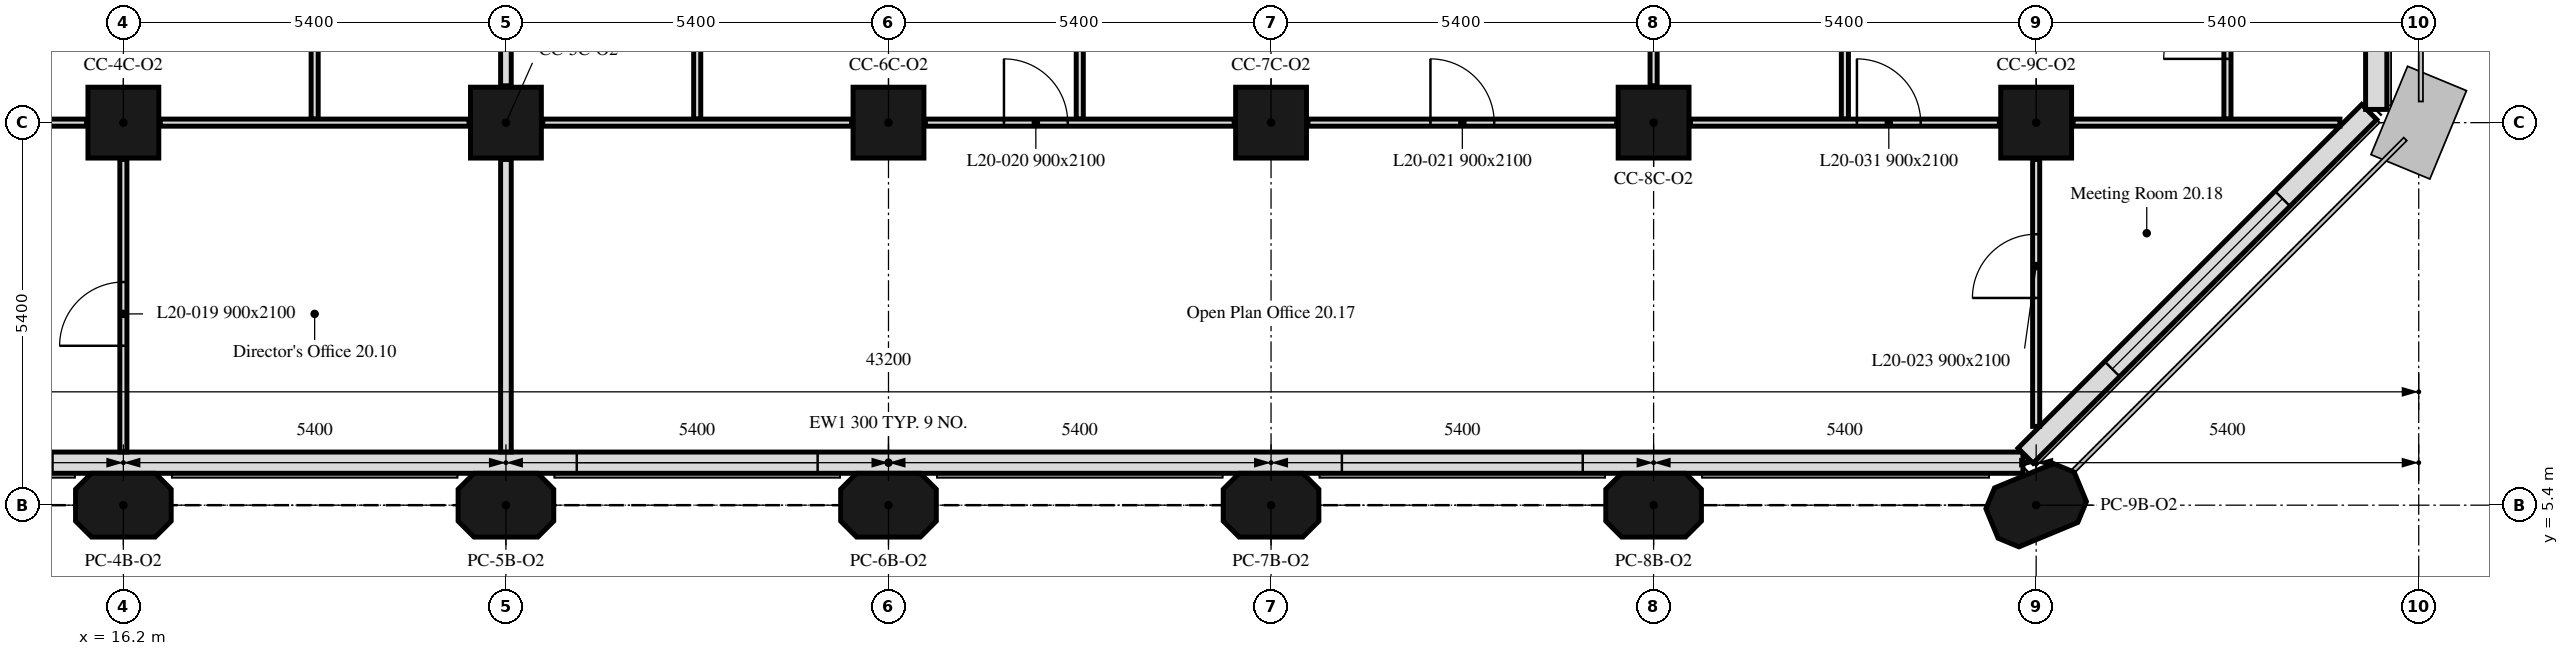
"""IFC4 building model, lengths in metres.
Left out: names, types, materials, properties, quantities, classifications, styles, units other than length and angle.
Written with IfcOpenShell. Run it as: python <this file> out.ifc"""

import sys

from ifc_helpers import new_model, si_unit, direction, frame, frame_2d, origin, origin_2d, place, context, subcontext, project, spatial, polyline, rectangle, outline, extrude, element, fill, save


model = new_model("IFC4")
c1 = context("Model", 3, precision=1e-05, world=origin(), true_north=direction((0.0, 1.0)))
c2 = subcontext(c1, "Body", "Model", "MODEL_VIEW")
j1 = project(units=[si_unit("LENGTHUNIT", "METRE"), si_unit("PLANEANGLEUNIT", "RADIAN")], contexts=[c1])
p1 = place(None, origin())
s1 = spatial("IfcSite", under=j1, at=p1, CompositionType="ELEMENT")
p2 = place(p1, origin())
s2 = spatial("IfcBuilding", under=s1, at=p2, CompositionType="ELEMENT")
p3 = place(p2, frame((0.0, 0.0, 87.8)))
s3 = spatial("IfcBuildingStorey", under=s2, at=p3, CompositionType="ELEMENT", Elevation=87.8)
for number, where, z_axis, x_axis in (
    (1, (16.2, 5.4, 0.0), (0.0, 0.0, 1.0), (1.0, 0.0, 0.0)),
    (2, (21.6, 5.4, 0.0), (0.0, 0.0, 1.0), (1.0, 0.0, 0.0)),
    (3, (27.0, 5.4, 0.0), (0.0, 0.0, 1.0), (1.0, 0.0, 0.0)),
    (4, (32.4, 5.4, 0.0), (0.0, 0.0, 1.0), (1.0, 0.0, 0.0)),
    (5, (37.8, 5.4, 0.0), (0.0, 0.0, 1.0), (1.0, 0.0, 0.0)),
    (6, (43.2, 5.4, 0.0), (0.0, 0.0, 1.0), (0.924, 0.383, 0.0)),
):
    element("IfcColumn", number, at=place(p3, frame(where, z_axis=z_axis, x_axis=x_axis)), inside=s3, PredefinedType="COLUMN", context=c2, shape_type="SweptSolid", body=[
        extrude(outline(polyline([(-0.45, -0.45), (0.45, -0.45), (0.675, -0.225), (0.675, 0.225), (0.45, 0.45), (-0.45, 0.45), (-0.675, 0.225), (-0.675, -0.225), (-0.45, -0.45)])), origin(), (0.0, 0.0, 1.0), 3.5),
    ])
for number, where, z_axis, x_axis in (
    (7, (16.2, 10.8, 0.0), (0.0, 0.0, 1.0), (1.0, 0.0, 0.0)),
    (8, (21.6, 10.8, 0.0), (0.0, 0.0, 1.0), (1.0, 0.0, 0.0)),
    (9, (27.0, 10.8, 0.0), (0.0, 0.0, 1.0), (1.0, 0.0, 0.0)),
    (10, (32.4, 10.8, 0.0), (0.0, 0.0, 1.0), (1.0, 0.0, 0.0)),
    (11, (37.8, 10.8, 0.0), (0.0, 0.0, 1.0), (1.0, 0.0, 0.0)),
    (12, (43.2, 10.8, 0.0), (0.0, 0.0, 1.0), (1.0, 0.0, 0.0)),
):
    element("IfcColumn", number, at=place(p3, frame(where, z_axis=z_axis, x_axis=x_axis)), inside=s3, PredefinedType="COLUMN", context=c2, shape_type="SweptSolid", body=[
        extrude(rectangle(XDim=1.0, YDim=1.0, at=origin_2d()), origin(), (0.0, 0.0, 1.0), 3.5),
    ])
p4 = place(p3, frame((10.986, 6.0, 0.0), z_axis=(0.0, 0.0, 1.0), x_axis=(1.0, 0.0, 0.0)))
e13 = element("IfcWall", 13, at=p4, inside=s3, PredefinedType="SOLIDWALL", context=c2, shape_type="SweptSolid", body=[
    extrude(rectangle(XDim=32.027, YDim=0.3, at=frame_2d((16.014, 0.0))), origin(), (0.0, 0.0, 1.0), 3.5),
])
p5 = place(p4, frame((0.814, 0.0, 0.9)))
e14 = element("IfcOpeningElement", 14, at=p5, cuts=e13, PredefinedType="OPENING", context=c2, shape_type="SweptSolid", body=[
    extrude(rectangle(XDim=3.4, YDim=1.7, at=frame_2d((1.7, 0.85))), frame((0.0, 0.16, 0.0), z_axis=(0.0, -1.0, 0.0), x_axis=(1.0, 0.0, 0.0)), (0.0, 0.0, 1.0), 0.32),
])
p6 = place(p4, frame((11.614, 0.0, 0.9)))
e15 = element("IfcOpeningElement", 15, at=p6, cuts=e13, PredefinedType="OPENING", context=c2, shape_type="SweptSolid", body=[
    extrude(rectangle(XDim=3.4, YDim=1.7, at=frame_2d((1.7, 0.85))), frame((0.0, 0.16, 0.0), z_axis=(0.0, -1.0, 0.0), x_axis=(1.0, 0.0, 0.0)), (0.0, 0.0, 1.0), 0.32),
])
p7 = place(p4, frame((22.414, 0.0, 0.9)))
e16 = element("IfcOpeningElement", 16, at=p7, cuts=e13, PredefinedType="OPENING", context=c2, shape_type="SweptSolid", body=[
    extrude(rectangle(XDim=3.4, YDim=1.7, at=frame_2d((1.7, 0.85))), frame((0.0, 0.16, 0.0), z_axis=(0.0, -1.0, 0.0), x_axis=(1.0, 0.0, 0.0)), (0.0, 0.0, 1.0), 0.32),
])
p8 = place(p3, frame((43.051, 6.099, 0.0), z_axis=(0.0, 0.0, 1.0), x_axis=(0.707106781187, 0.707106781187, 0.0)))
e17 = element("IfcWall", 17, at=p8, inside=s3, PredefinedType="SOLIDWALL", context=c2, shape_type="SweptSolid", body=[
    extrude(rectangle(XDim=6.86, YDim=0.3, at=frame_2d((3.43, 0.0))), origin(), (0.0, 0.0, 1.0), 3.5),
])
p9 = place(p8, frame((1.73, 0.0, 0.9)))
e18 = element("IfcOpeningElement", 18, at=p9, cuts=e17, PredefinedType="OPENING", context=c2, shape_type="SweptSolid", body=[
    extrude(rectangle(XDim=3.4, YDim=1.7, at=frame_2d((1.7, 0.85))), frame((0.0, 0.16, 0.0), z_axis=(0.0, -1.0, 0.0), x_axis=(1.0, 0.0, 0.0)), (0.0, 0.0, 1.0), 0.32),
])
p10 = place(p3, frame((48.0, 10.986, 0.0), z_axis=(0.0, 0.0, 1.0), x_axis=(0.0, 1.0, 0.0)))
e19 = element("IfcWall", 19, at=p10, inside=s3, PredefinedType="SOLIDWALL", context=c2, shape_type="SweptSolid", body=[
    extrude(rectangle(XDim=32.027, YDim=0.3, at=frame_2d((16.014, 0.0))), origin(), (0.0, 0.0, 1.0), 3.5),
])
p11 = place(p10, frame((1.164, 0.0, 0.9)))
e20 = element("IfcOpeningElement", 20, at=p11, cuts=e19, PredefinedType="OPENING", context=c2, shape_type="SweptSolid", body=[
    extrude(rectangle(XDim=1.1, YDim=1.7, at=frame_2d((0.55, 0.85))), frame((0.0, 0.16, 0.0), z_axis=(0.0, -1.0, 0.0), x_axis=(1.0, 0.0, 0.0)), (0.0, 0.0, 1.0), 0.32),
])
p12 = place(p10, frame((2.764, 0.0, 0.9)))
e21 = element("IfcOpeningElement", 21, at=p12, cuts=e19, PredefinedType="OPENING", context=c2, shape_type="SweptSolid", body=[
    extrude(rectangle(XDim=1.1, YDim=1.7, at=frame_2d((0.55, 0.85))), frame((0.0, 0.16, 0.0), z_axis=(0.0, -1.0, 0.0), x_axis=(1.0, 0.0, 0.0)), (0.0, 0.0, 1.0), 0.32),
])
p13 = place(p10, frame((11.614, 0.0, 0.9)))
e22 = element("IfcOpeningElement", 22, at=p13, cuts=e19, PredefinedType="OPENING", context=c2, shape_type="SweptSolid", body=[
    extrude(rectangle(XDim=3.4, YDim=1.7, at=frame_2d((1.7, 0.85))), frame((0.0, 0.16, 0.0), z_axis=(0.0, -1.0, 0.0), x_axis=(1.0, 0.0, 0.0)), (0.0, 0.0, 1.0), 0.32),
])
p14 = place(p10, frame((22.764, 0.0, 0.9)))
e23 = element("IfcOpeningElement", 23, at=p14, cuts=e19, PredefinedType="OPENING", context=c2, shape_type="SweptSolid", body=[
    extrude(rectangle(XDim=1.1, YDim=1.7, at=frame_2d((0.55, 0.85))), frame((0.0, 0.16, 0.0), z_axis=(0.0, -1.0, 0.0), x_axis=(1.0, 0.0, 0.0)), (0.0, 0.0, 1.0), 0.32),
])
p15 = place(p10, frame((24.364, 0.0, 0.9)))
e24 = element("IfcOpeningElement", 24, at=p15, cuts=e19, PredefinedType="OPENING", context=c2, shape_type="SweptSolid", body=[
    extrude(rectangle(XDim=1.1, YDim=1.7, at=frame_2d((0.55, 0.85))), frame((0.0, 0.16, 0.0), z_axis=(0.0, -1.0, 0.0), x_axis=(1.0, 0.0, 0.0)), (0.0, 0.0, 1.0), 0.32),
])
p16 = place(p3, frame((11.32, 10.8, 0.0), z_axis=(0.0, 0.0, 1.0), x_axis=(1.0, 0.0, 0.0)))
e25 = element("IfcWall", 25, at=p16, inside=s3, PredefinedType="PARTITIONING", context=c2, shape_type="SweptSolid", body=[
    extrude(rectangle(XDim=4.36, YDim=0.1, at=frame_2d((2.18, 0.0))), origin(), (0.0, 0.0, 1.0), 3.5),
])
p17 = place(p16, frame((1.11, 0.0, 0.0)))
e26 = element("IfcOpeningElement", 26, at=p17, cuts=e25, PredefinedType="OPENING", context=c2, shape_type="SweptSolid", body=[
    extrude(rectangle(XDim=0.9, YDim=2.1, at=frame_2d((0.45, 1.05))), frame((0.0, 0.05, 0.0), z_axis=(0.0, -1.0, 0.0), x_axis=(1.0, 0.0, 0.0)), (0.0, 0.0, 1.0), 0.1),
])
p18 = place(p16, frame((2.35, 0.0, 0.0)))
e27 = element("IfcOpeningElement", 27, at=p18, cuts=e25, PredefinedType="OPENING", context=c2, shape_type="SweptSolid", body=[
    extrude(rectangle(XDim=0.9, YDim=2.1, at=frame_2d((0.45, 1.05))), frame((0.0, 0.05, 0.0), z_axis=(0.0, -1.0, 0.0), x_axis=(1.0, 0.0, 0.0)), (0.0, 0.0, 1.0), 0.1),
])
p19 = place(p3, frame((18.9, 10.85, 0.0), z_axis=(0.0, 0.0, 1.0), x_axis=(0.0, 1.0, 0.0)))
e28 = element("IfcWall", 28, at=p19, inside=s3, PredefinedType="PARTITIONING", context=c2, shape_type="SweptSolid", body=[
    extrude(rectangle(XDim=2.575, YDim=0.1, at=frame_2d((1.288, 0.0))), origin(), (0.0, 0.0, 1.0), 3.5),
])
p20 = place(p19, frame((1.425, 0.0, 0.0)))
e29 = element("IfcOpeningElement", 29, at=p20, cuts=e28, PredefinedType="OPENING", context=c2, shape_type="SweptSolid", body=[
    extrude(rectangle(XDim=0.9, YDim=2.1, at=frame_2d((0.45, 1.05))), frame((0.0, 0.05, 0.0), z_axis=(0.0, -1.0, 0.0), x_axis=(1.0, 0.0, 0.0)), (0.0, 0.0, 1.0), 0.1),
])
p21 = place(p3, frame((16.72, 10.8, 0.0), z_axis=(0.0, 0.0, 1.0), x_axis=(1.0, 0.0, 0.0)))
e30 = element("IfcWall", 30, at=p21, inside=s3, PredefinedType="PARTITIONING", context=c2, shape_type="SweptSolid", body=[
    extrude(rectangle(XDim=4.36, YDim=0.1, at=frame_2d((2.18, 0.0))), origin(), (0.0, 0.0, 1.0), 3.5),
])
p22 = place(p3, frame((21.6, 11.32, 0.0), z_axis=(0.0, 0.0, 1.0), x_axis=(0.0, 1.0, 0.0)))
e31 = element("IfcWall", 31, at=p22, inside=s3, PredefinedType="PARTITIONING", context=c2, shape_type="SweptSolid", body=[
    extrude(rectangle(XDim=2.105, YDim=0.15, at=frame_2d((1.052, 0.0))), origin(), (0.0, 0.0, 1.0), 3.5),
])
p23 = place(p3, frame((16.2, 6.151, 0.0), z_axis=(0.0, 0.0, 1.0), x_axis=(0.0, 1.0, 0.0)))
e32 = element("IfcWall", 32, at=p23, inside=s3, PredefinedType="PARTITIONING", context=c2, shape_type="SweptSolid", body=[
    extrude(rectangle(XDim=4.129, YDim=0.1, at=frame_2d((2.064, 0.0))), origin(), (0.0, 0.0, 1.0), 3.5),
])
p24 = place(p23, frame((1.499, 0.0, 0.0)))
e33 = element("IfcOpeningElement", 33, at=p24, cuts=e32, PredefinedType="OPENING", context=c2, shape_type="SweptSolid", body=[
    extrude(rectangle(XDim=0.9, YDim=2.1, at=frame_2d((0.45, 1.05))), frame((0.0, 0.05, 0.0), z_axis=(0.0, -1.0, 0.0), x_axis=(1.0, 0.0, 0.0)), (0.0, 0.0, 1.0), 0.1),
])
p25 = place(p3, frame((21.6, 6.151, 0.0), z_axis=(0.0, 0.0, 1.0), x_axis=(0.0, 1.0, 0.0)))
e34 = element("IfcWall", 34, at=p25, inside=s3, PredefinedType="PARTITIONING", context=c2, shape_type="SweptSolid", body=[
    extrude(rectangle(XDim=4.129, YDim=0.15, at=frame_2d((2.064, 0.0))), origin(), (0.0, 0.0, 1.0), 3.5),
])
p26 = place(p3, frame((24.3, 10.85, 0.0), z_axis=(0.0, 0.0, 1.0), x_axis=(0.0, 1.0, 0.0)))
e35 = element("IfcWall", 35, at=p26, inside=s3, PredefinedType="PARTITIONING", context=c2, shape_type="SweptSolid", body=[
    extrude(rectangle(XDim=2.575, YDim=0.1, at=frame_2d((1.288, 0.0))), origin(), (0.0, 0.0, 1.0), 3.5),
])
p27 = place(p3, frame((22.12, 10.8, 0.0), z_axis=(0.0, 0.0, 1.0), x_axis=(1.0, 0.0, 0.0)))
e36 = element("IfcWall", 36, at=p27, inside=s3, PredefinedType="PARTITIONING", context=c2, shape_type="SweptSolid", body=[
    extrude(rectangle(XDim=4.36, YDim=0.1, at=frame_2d((2.18, 0.0))), origin(), (0.0, 0.0, 1.0), 3.5),
])
p28 = place(p3, frame((29.7, 10.85, 0.0), z_axis=(0.0, 0.0, 1.0), x_axis=(0.0, 1.0, 0.0)))
e37 = element("IfcWall", 37, at=p28, inside=s3, PredefinedType="PARTITIONING", context=c2, shape_type="SweptSolid", body=[
    extrude(rectangle(XDim=2.575, YDim=0.1, at=frame_2d((1.288, 0.0))), origin(), (0.0, 0.0, 1.0), 3.5),
])
p29 = place(p3, frame((27.52, 10.8, 0.0), z_axis=(0.0, 0.0, 1.0), x_axis=(1.0, 0.0, 0.0)))
e38 = element("IfcWall", 38, at=p29, inside=s3, PredefinedType="PARTITIONING", context=c2, shape_type="SweptSolid", body=[
    extrude(rectangle(XDim=4.36, YDim=0.1, at=frame_2d((2.18, 0.0))), origin(), (0.0, 0.0, 1.0), 3.5),
])
p30 = place(p29, frame((1.11, 0.0, 0.0)))
e39 = element("IfcOpeningElement", 39, at=p30, cuts=e38, PredefinedType="OPENING", context=c2, shape_type="SweptSolid", body=[
    extrude(rectangle(XDim=0.9, YDim=2.1, at=frame_2d((0.45, 1.05))), frame((0.0, 0.05, 0.0), z_axis=(0.0, -1.0, 0.0), x_axis=(1.0, 0.0, 0.0)), (0.0, 0.0, 1.0), 0.1),
])
p31 = place(p3, frame((32.92, 10.8, 0.0), z_axis=(0.0, 0.0, 1.0), x_axis=(1.0, 0.0, 0.0)))
e40 = element("IfcWall", 40, at=p31, inside=s3, PredefinedType="PARTITIONING", context=c2, shape_type="SweptSolid", body=[
    extrude(rectangle(XDim=4.36, YDim=0.1, at=frame_2d((2.18, 0.0))), origin(), (0.0, 0.0, 1.0), 3.5),
])
p32 = place(p31, frame((1.73, 0.0, 0.0)))
e41 = element("IfcOpeningElement", 41, at=p32, cuts=e40, PredefinedType="OPENING", context=c2, shape_type="SweptSolid", body=[
    extrude(rectangle(XDim=0.9, YDim=2.1, at=frame_2d((0.45, 1.05))), frame((0.0, 0.05, 0.0), z_axis=(0.0, -1.0, 0.0), x_axis=(1.0, 0.0, 0.0)), (0.0, 0.0, 1.0), 0.1),
])
p33 = place(p3, frame((37.8, 11.32, 0.0), z_axis=(0.0, 0.0, 1.0), x_axis=(0.0, 1.0, 0.0)))
e42 = element("IfcWall", 42, at=p33, inside=s3, PredefinedType="PARTITIONING", context=c2, shape_type="SweptSolid", body=[
    extrude(rectangle(XDim=2.105, YDim=0.1, at=frame_2d((1.052, 0.0))), origin(), (0.0, 0.0, 1.0), 3.5),
])
p34 = place(p3, frame((40.5, 10.85, 0.0), z_axis=(0.0, 0.0, 1.0), x_axis=(0.0, 1.0, 0.0)))
e43 = element("IfcWall", 43, at=p34, inside=s3, PredefinedType="PARTITIONING", context=c2, shape_type="SweptSolid", body=[
    extrude(rectangle(XDim=2.575, YDim=0.1, at=frame_2d((1.288, 0.0))), origin(), (0.0, 0.0, 1.0), 3.5),
])
p35 = place(p3, frame((38.32, 10.8, 0.0), z_axis=(0.0, 0.0, 1.0), x_axis=(1.0, 0.0, 0.0)))
e44 = element("IfcWall", 44, at=p35, inside=s3, PredefinedType="PARTITIONING", context=c2, shape_type="SweptSolid", body=[
    extrude(rectangle(XDim=4.36, YDim=0.1, at=frame_2d((2.18, 0.0))), origin(), (0.0, 0.0, 1.0), 3.5),
])
p36 = place(p35, frame((2.35, 0.0, 0.0)))
e45 = element("IfcOpeningElement", 45, at=p36, cuts=e44, PredefinedType="OPENING", context=c2, shape_type="SweptSolid", body=[
    extrude(rectangle(XDim=0.9, YDim=2.1, at=frame_2d((0.45, 1.05))), frame((0.0, 0.05, 0.0), z_axis=(0.0, -1.0, 0.0), x_axis=(1.0, 0.0, 0.0)), (0.0, 0.0, 1.0), 0.1),
])
p37 = place(p3, frame((45.9, 10.85, 0.0), z_axis=(0.0, 0.0, 1.0), x_axis=(0.0, 1.0, 0.0)))
e46 = element("IfcWall", 46, at=p37, inside=s3, PredefinedType="PARTITIONING", context=c2, shape_type="SweptSolid", body=[
    extrude(rectangle(XDim=2.575, YDim=0.1, at=frame_2d((1.288, 0.0))), origin(), (0.0, 0.0, 1.0), 3.5),
])
p38 = place(p37, frame((0.85, 0.0, 0.0)))
e47 = element("IfcOpeningElement", 47, at=p38, cuts=e46, PredefinedType="OPENING", context=c2, shape_type="SweptSolid", body=[
    extrude(rectangle(XDim=0.9, YDim=2.1, at=frame_2d((0.45, 1.05))), frame((0.0, 0.05, 0.0), z_axis=(0.0, -1.0, 0.0), x_axis=(1.0, 0.0, 0.0)), (0.0, 0.0, 1.0), 0.1),
])
p39 = place(p3, frame((43.72, 10.8, 0.0), z_axis=(0.0, 0.0, 1.0), x_axis=(1.0, 0.0, 0.0)))
e48 = element("IfcWall", 48, at=p39, inside=s3, PredefinedType="PARTITIONING", context=c2, shape_type="SweptSolid", body=[
    extrude(rectangle(XDim=3.768, YDim=0.1, at=frame_2d((1.884, 0.0))), origin(), (0.0, 0.0, 1.0), 3.5),
])
p40 = place(p3, frame((43.2, 6.512, 0.0), z_axis=(0.0, 0.0, 1.0), x_axis=(0.0, 1.0, 0.0)))
e49 = element("IfcWall", 49, at=p40, inside=s3, PredefinedType="PARTITIONING", context=c2, shape_type="SweptSolid", body=[
    extrude(rectangle(XDim=3.768, YDim=0.1, at=frame_2d((1.884, 0.0))), origin(), (0.0, 0.0, 1.0), 3.5),
])
p41 = place(p40, frame((1.813, 0.0, 0.0)))
e50 = element("IfcOpeningElement", 50, at=p41, cuts=e49, PredefinedType="OPENING", context=c2, shape_type="SweptSolid", body=[
    extrude(rectangle(XDim=0.9, YDim=2.1, at=frame_2d((0.45, 1.05))), frame((0.0, 0.05, 0.0), z_axis=(0.0, -1.0, 0.0), x_axis=(1.0, 0.0, 0.0)), (0.0, 0.0, 1.0), 0.1),
])
p42 = place(p6, origin())
e51 = element("IfcWindow", 51, at=p42, inside=s3, PartitioningType="SINGLE_PANEL", PredefinedType="WINDOW", context=c2, shape_type="SweptSolid", body=[
    extrude(rectangle(XDim=3.4, YDim=1.7, at=frame_2d((1.7, 0.85))), frame((0.0, 0.03, 0.0), z_axis=(0.0, -1.0, 0.0), x_axis=(1.0, 0.0, 0.0)), (0.0, 0.0, 1.0), 0.06),
])
fill(e15, e51)
p43 = place(p7, origin())
e52 = element("IfcWindow", 52, at=p43, inside=s3, PartitioningType="SINGLE_PANEL", PredefinedType="WINDOW", context=c2, shape_type="SweptSolid", body=[
    extrude(rectangle(XDim=3.4, YDim=1.7, at=frame_2d((1.7, 0.85))), frame((0.0, 0.03, 0.0), z_axis=(0.0, -1.0, 0.0), x_axis=(1.0, 0.0, 0.0)), (0.0, 0.0, 1.0), 0.06),
])
fill(e16, e52)
p44 = place(p9, origin())
e53 = element("IfcWindow", 53, at=p44, inside=s3, PartitioningType="SINGLE_PANEL", PredefinedType="WINDOW", context=c2, shape_type="SweptSolid", body=[
    extrude(rectangle(XDim=3.4, YDim=1.7, at=frame_2d((1.7, 0.85))), frame((0.0, 0.03, 0.0), z_axis=(0.0, -1.0, 0.0), x_axis=(1.0, 0.0, 0.0)), (0.0, 0.0, 1.0), 0.06),
])
fill(e18, e53)
p45 = place(p24, origin())
e54 = element("IfcDoor", 54, at=p45, inside=s3, OperationType="SINGLE_SWING_RIGHT", PredefinedType="DOOR", context=c2, shape_type="SweptSolid", body=[
    extrude(rectangle(XDim=0.9, YDim=2.1, at=frame_2d((0.45, 1.05))), frame((0.0, 0.025, 0.0), z_axis=(0.0, -1.0, 0.0), x_axis=(1.0, 0.0, 0.0)), (0.0, 0.0, 1.0), 0.05),
])
fill(e33, e54)
p46 = place(p30, origin())
e55 = element("IfcDoor", 55, at=p46, inside=s3, OperationType="SINGLE_SWING_LEFT", PredefinedType="DOOR", context=c2, shape_type="SweptSolid", body=[
    extrude(rectangle(XDim=0.9, YDim=2.1, at=frame_2d((0.45, 1.05))), frame((0.0, 0.025, 0.0), z_axis=(0.0, -1.0, 0.0), x_axis=(1.0, 0.0, 0.0)), (0.0, 0.0, 1.0), 0.05),
])
fill(e39, e55)
p47 = place(p32, origin())
e56 = element("IfcDoor", 56, at=p47, inside=s3, OperationType="SINGLE_SWING_LEFT", PredefinedType="DOOR", context=c2, shape_type="SweptSolid", body=[
    extrude(rectangle(XDim=0.9, YDim=2.1, at=frame_2d((0.45, 1.05))), frame((0.0, 0.025, 0.0), z_axis=(0.0, -1.0, 0.0), x_axis=(1.0, 0.0, 0.0)), (0.0, 0.0, 1.0), 0.05),
])
fill(e41, e56)
p48 = place(p38, origin())
e57 = element("IfcDoor", 57, at=p48, inside=s3, OperationType="SINGLE_SWING_LEFT", PredefinedType="DOOR", context=c2, shape_type="SweptSolid", body=[
    extrude(rectangle(XDim=0.9, YDim=2.1, at=frame_2d((0.45, 1.05))), frame((0.0, 0.025, 0.0), z_axis=(0.0, -1.0, 0.0), x_axis=(1.0, 0.0, 0.0)), (0.0, 0.0, 1.0), 0.05),
])
fill(e47, e57)
p49 = place(p41, origin())
e58 = element("IfcDoor", 58, at=p49, inside=s3, OperationType="SINGLE_SWING_RIGHT", PredefinedType="DOOR", context=c2, shape_type="SweptSolid", body=[
    extrude(rectangle(XDim=0.9, YDim=2.1, at=frame_2d((0.45, 1.05))), frame((0.0, 0.025, 0.0), z_axis=(0.0, -1.0, 0.0), x_axis=(1.0, 0.0, 0.0)), (0.0, 0.0, 1.0), 0.05),
])
fill(e50, e58)
p50 = place(p36, origin())
e59 = element("IfcDoor", 59, at=p50, inside=s3, OperationType="SINGLE_SWING_LEFT", PredefinedType="DOOR", context=c2, shape_type="SweptSolid", body=[
    extrude(rectangle(XDim=0.9, YDim=2.1, at=frame_2d((0.45, 1.05))), frame((0.0, 0.025, 0.0), z_axis=(0.0, -1.0, 0.0), x_axis=(1.0, 0.0, 0.0)), (0.0, 0.0, 1.0), 0.05),
])
fill(e45, e59)
save(model, sys.argv[1])
